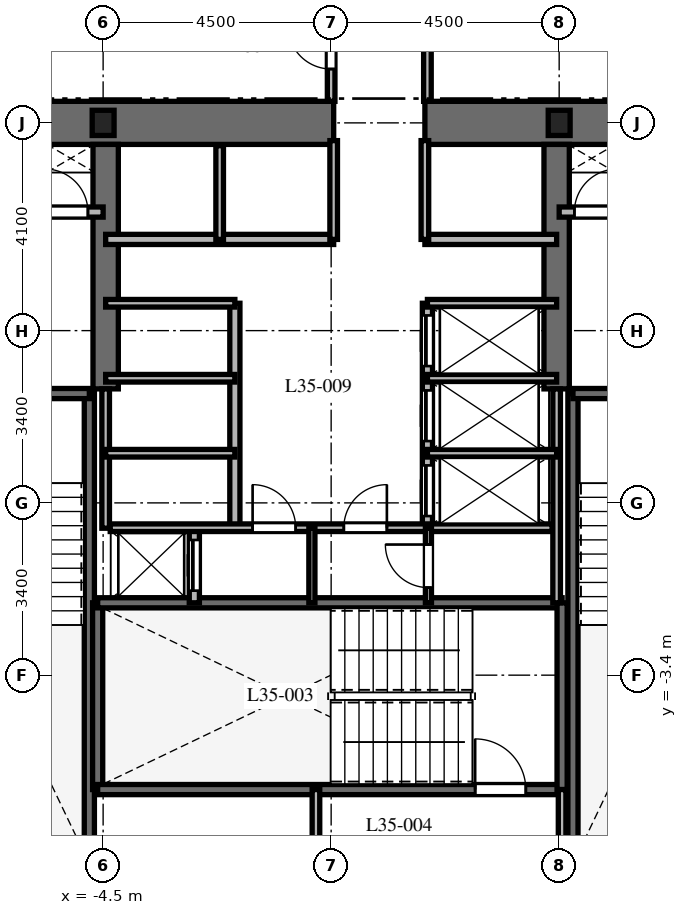
"""IFC4 building model, lengths in metres.
Left out: names, types, materials, properties, quantities, classifications, styles, units other than length and angle.
Written with IfcOpenShell. Run it as: python <this file> out.ifc"""

import sys

from ifc_helpers import new_model, si_unit, direction, frame, frame_2d, origin, origin_2d, place, context, subcontext, project, spatial, rectangle, i_section, extrude, element, fill, save


model = new_model("IFC4")
c1 = context("Model", 3, precision=1e-05, world=origin(), true_north=direction((0.0, 1.0)))
c2 = subcontext(c1, "Body", "Model", "MODEL_VIEW")
j1 = project(units=[si_unit("LENGTHUNIT", "METRE"), si_unit("PLANEANGLEUNIT", "RADIAN")], contexts=[c1])
p1 = place(None, origin())
s1 = spatial("IfcSite", under=j1, at=p1, CompositionType="ELEMENT")
p2 = place(p1, origin())
s2 = spatial("IfcBuilding", under=s1, at=p2, CompositionType="ELEMENT")
p3 = place(p2, frame((0.0, 0.0, 144.3)))
s3 = spatial("IfcBuildingStorey", under=s2, at=p3, CompositionType="ELEMENT", Elevation=144.3)
p4 = place(p3, frame((-9.425, 7.5, 0.0), z_axis=(0.0, 0.0, 1.0), x_axis=(1.0, 0.0, 0.0)))
e1 = element("IfcWall", 1, at=p4, inside=s3, PredefinedType="SHEAR", context=c2, shape_type="SweptSolid", body=[
    extrude(rectangle(XDim=9.475, YDim=0.85, at=frame_2d((4.738, 0.0))), origin(), (0.0, 0.0, 1.0), 3.7),
])
p5 = place(p3, frame((1.85, 7.5, 0.0), z_axis=(0.0, 0.0, 1.0), x_axis=(1.0, 0.0, 0.0)))
e2 = element("IfcWall", 2, at=p5, inside=s3, PredefinedType="SHEAR", context=c2, shape_type="SweptSolid", body=[
    extrude(rectangle(XDim=7.575, YDim=0.85, at=frame_2d((3.788, 0.0))), origin(), (0.0, 0.0, 1.0), 3.7),
])
for number, where, z_axis, x_axis in (
    (3, (-4.45, 2.25, 0.0), (0.0, 0.0, 1.0), (0.0, 1.0, 0.0)),
    (4, (4.45, 2.25, 0.0), (0.0, 0.0, 1.0), (0.0, 1.0, 0.0)),
):
    element("IfcWall", number, at=place(p3, frame(where, z_axis=z_axis, x_axis=x_axis)), inside=s3, PredefinedType="SHEAR", context=c2, shape_type="SweptSolid", body=[
        extrude(rectangle(XDim=4.825, YDim=0.5, at=frame_2d((2.413, 0.0))), origin(), (0.0, 0.0, 1.0), 3.7),
    ])
p6 = place(p3, frame((-4.772, -6.985, 0.0), z_axis=(0.0, 0.0, 1.0), x_axis=(0.0, 1.0, 0.0)))
e5 = element("IfcWall", 5, at=p6, inside=s3, PredefinedType="SHEAR", context=c2, shape_type="SweptSolid", body=[
    extrude(rectangle(XDim=9.143, YDim=0.2, at=frame_2d((4.572, 0.0))), origin(), (0.0, 0.0, 1.0), 3.7),
])
p7 = place(p3, frame((-8.458, 2.158, 0.0), z_axis=(0.0, 0.0, 1.0), x_axis=(1.0, 0.0, 0.0)))
e6 = element("IfcWall", 6, at=p7, inside=s3, PredefinedType="SHEAR", context=c2, shape_type="SweptSolid", body=[
    extrude(rectangle(XDim=3.686, YDim=0.2, at=frame_2d((1.843, 0.0))), origin(), (0.0, 0.0, 1.0), 3.7),
])
p8 = place(p7, frame((1.3, 0.0, 0.0)))
e7 = element("IfcOpeningElement", 7, at=p8, cuts=e6, PredefinedType="OPENING", context=c2, shape_type="SweptSolid", body=[
    extrude(rectangle(XDim=1.0, YDim=2.15, at=frame_2d((0.5, 1.075))), frame((0.0, 0.11, 0.0), z_axis=(0.0, -1.0, 0.0), x_axis=(1.0, 0.0, 0.0)), (0.0, 0.0, 1.0), 0.22),
])
p9 = place(p3, frame((4.772, -6.985, 0.0), z_axis=(0.0, 0.0, 1.0), x_axis=(0.0, 1.0, 0.0)))
e8 = element("IfcWall", 8, at=p9, inside=s3, PredefinedType="SHEAR", context=c2, shape_type="SweptSolid", body=[
    extrude(rectangle(XDim=9.143, YDim=0.2, at=frame_2d((4.572, 0.0))), origin(), (0.0, 0.0, 1.0), 3.7),
])
p10 = place(p3, frame((4.772, 2.158, 0.0), z_axis=(0.0, 0.0, 1.0), x_axis=(1.0, 0.0, 0.0)))
e9 = element("IfcWall", 9, at=p10, inside=s3, PredefinedType="SHEAR", context=c2, shape_type="SweptSolid", body=[
    extrude(rectangle(XDim=3.686, YDim=0.2, at=frame_2d((1.843, 0.0))), origin(), (0.0, 0.0, 1.0), 3.7),
])
p11 = place(p10, frame((1.35, 0.0, 0.0)))
e10 = element("IfcOpeningElement", 10, at=p11, cuts=e9, PredefinedType="OPENING", context=c2, shape_type="SweptSolid", body=[
    extrude(rectangle(XDim=1.0, YDim=2.15, at=frame_2d((0.5, 1.075))), frame((0.0, 0.11, 0.0), z_axis=(0.0, -1.0, 0.0), x_axis=(1.0, 0.0, 0.0)), (0.0, 0.0, 1.0), 0.22),
])
p12 = place(p3, frame((-4.608, -5.658, 0.0), z_axis=(0.0, 0.0, 1.0), x_axis=(0.0, 1.0, 0.0)))
e11 = element("IfcWall", 11, at=p12, inside=s3, PredefinedType="SHEAR", context=c2, shape_type="SweptSolid", body=[
    extrude(rectangle(XDim=3.686, YDim=0.2, at=frame_2d((1.843, 0.0))), origin(), (0.0, 0.0, 1.0), 3.7),
])
p13 = place(p3, frame((-4.608, -5.658, 0.0), z_axis=(0.0, 0.0, 1.0), x_axis=(1.0, 0.0, 0.0)))
e12 = element("IfcWall", 12, at=p13, inside=s3, PredefinedType="SHEAR", context=c2, shape_type="SweptSolid", body=[
    extrude(rectangle(XDim=9.166, YDim=0.2, at=frame_2d((4.583, 0.0))), origin(), (0.0, 0.0, 1.0), 3.7),
])
p14 = place(p13, frame((7.45, 0.0, 0.0)))
e13 = element("IfcOpeningElement", 13, at=p14, cuts=e12, PredefinedType="OPENING", context=c2, shape_type="SweptSolid", body=[
    extrude(rectangle(XDim=1.0, YDim=2.15, at=frame_2d((0.5, 1.075))), frame((0.0, 0.11, 0.0), z_axis=(0.0, -1.0, 0.0), x_axis=(1.0, 0.0, 0.0)), (0.0, 0.0, 1.0), 0.22),
])
p15 = place(p3, frame((-4.608, -1.972, 0.0), z_axis=(0.0, 0.0, 1.0), x_axis=(1.0, 0.0, 0.0)))
e14 = element("IfcWall", 14, at=p15, inside=s3, PredefinedType="SHEAR", context=c2, shape_type="SweptSolid", body=[
    extrude(rectangle(XDim=9.166, YDim=0.2, at=frame_2d((4.583, 0.0))), origin(), (0.0, 0.0, 1.0), 3.7),
])
p16 = place(p3, frame((4.558, -5.658, 0.0), z_axis=(0.0, 0.0, 1.0), x_axis=(0.0, 1.0, 0.0)))
e15 = element("IfcWall", 15, at=p16, inside=s3, PredefinedType="SHEAR", context=c2, shape_type="SweptSolid", body=[
    extrude(rectangle(XDim=3.686, YDim=0.2, at=frame_2d((1.843, 0.0))), origin(), (0.0, 0.0, 1.0), 3.7),
])
for number, where, z_axis, x_axis in (
    (16, (4.5, 7.5, 0.0), (0.0, 0.0, 1.0), (1.0, 0.0, 0.0)),
    (17, (-4.5, 7.5, 0.0), (0.0, 0.0, 1.0), (1.0, 0.0, 0.0)),
):
    element("IfcColumn", number, at=place(p3, frame(where, z_axis=z_axis, x_axis=x_axis)), inside=s3, PredefinedType="COLUMN", context=c2, shape_type="SweptSolid", body=[
        extrude(i_section(OverallWidth=0.432, OverallDepth=0.498, WebThickness=0.056, FlangeThickness=0.089, at=origin_2d()), origin(), (0.0, 0.0, 1.0), 3.7),
    ])
for number, where, z_axis, x_axis in (
    (18, (-0.3, -7.02, 0.0), (0.0, 0.0, 1.0), (0.0, 1.0, 0.0)),
    (19, (4.558, -7.02, 0.0), (0.0, 0.0, 1.0), (0.0, 1.0, 0.0)),
):
    element("IfcWall", number, at=place(p3, frame(where, z_axis=z_axis, x_axis=x_axis)), inside=s3, PredefinedType="PARTITIONING", context=c2, shape_type="SweptSolid", body=[
        extrude(rectangle(XDim=1.362, YDim=0.15, at=frame_2d((0.681, 0.0))), origin(), (0.0, 0.0, 1.0), 3.4),
    ])
p17 = place(p3, frame((-8.55, 5.74, 0.0), z_axis=(0.0, 0.0, 1.0), x_axis=(1.0, 0.0, 0.0)))
e20 = element("IfcWall", 20, at=p17, inside=s3, PredefinedType="PARTITIONING", context=c2, shape_type="SweptSolid", body=[
    extrude(rectangle(XDim=4.05, YDim=0.2, at=frame_2d((2.025, 0.0))), origin(), (0.0, 0.0, 1.0), 3.4),
])
p18 = place(p17, frame((0.75, 0.0, 0.0)))
e21 = element("IfcOpeningElement", 21, at=p18, cuts=e20, PredefinedType="OPENING", context=c2, shape_type="SweptSolid", body=[
    extrude(rectangle(XDim=1.1, YDim=2.2, at=frame_2d((0.55, 1.1))), frame((0.0, 0.11, 0.0), z_axis=(0.0, -1.0, 0.0), x_axis=(1.0, 0.0, 0.0)), (0.0, 0.0, 1.0), 0.22),
])
p19 = place(p17, frame((2.9, 0.0, 0.0)))
e22 = element("IfcOpeningElement", 22, at=p19, cuts=e20, PredefinedType="OPENING", context=c2, shape_type="SweptSolid", body=[
    extrude(rectangle(XDim=0.85, YDim=2.03, at=frame_2d((0.425, 1.015))), frame((0.0, 0.11, 0.0), z_axis=(0.0, -1.0, 0.0), x_axis=(1.0, 0.0, 0.0)), (0.0, 0.0, 1.0), 0.22),
])
p20 = place(p3, frame((4.5, 5.74, 0.0), z_axis=(0.0, 0.0, 1.0), x_axis=(1.0, 0.0, 0.0)))
e23 = element("IfcWall", 23, at=p20, inside=s3, PredefinedType="PARTITIONING", context=c2, shape_type="SweptSolid", body=[
    extrude(rectangle(XDim=4.05, YDim=0.2, at=frame_2d((2.025, 0.0))), origin(), (0.0, 0.0, 1.0), 3.4),
])
p21 = place(p20, frame((0.3, 0.0, 0.0)))
e24 = element("IfcOpeningElement", 24, at=p21, cuts=e23, PredefinedType="OPENING", context=c2, shape_type="SweptSolid", body=[
    extrude(rectangle(XDim=0.85, YDim=2.03, at=frame_2d((0.425, 1.015))), frame((0.0, 0.11, 0.0), z_axis=(0.0, -1.0, 0.0), x_axis=(1.0, 0.0, 0.0)), (0.0, 0.0, 1.0), 0.22),
])
p22 = place(p20, frame((2.15, 0.0, 0.0)))
e25 = element("IfcOpeningElement", 25, at=p22, cuts=e23, PredefinedType="OPENING", context=c2, shape_type="SweptSolid", body=[
    extrude(rectangle(XDim=1.1, YDim=2.2, at=frame_2d((0.55, 1.1))), frame((0.0, 0.11, 0.0), z_axis=(0.0, -1.0, 0.0), x_axis=(1.0, 0.0, 0.0)), (0.0, 0.0, 1.0), 0.22),
])
p23 = place(p3, frame((-2.7, -1.972, 0.0), z_axis=(0.0, 0.0, 1.0), x_axis=(0.0, 1.0, 0.0)))
e26 = element("IfcWall", 26, at=p23, inside=s3, PredefinedType="PARTITIONING", context=c2, shape_type="SweptSolid", body=[
    extrude(rectangle(XDim=1.472, YDim=0.2, at=frame_2d((0.736, 0.0))), origin(), (0.0, 0.0, 1.0), 3.4),
])
p24 = place(p23, frame((0.24, 0.0, 0.0)))
e27 = element("IfcOpeningElement", 27, at=p24, cuts=e26, PredefinedType="OPENING", context=c2, shape_type="SweptSolid", body=[
    extrude(rectangle(XDim=1.0, YDim=2.2, at=frame_2d((0.5, 1.1))), frame((0.0, 0.11, 0.0), z_axis=(0.0, -1.0, 0.0), x_axis=(1.0, 0.0, 0.0)), (0.0, 0.0, 1.0), 0.22),
])
p25 = place(p3, frame((-4.45, 5.2, 0.0), z_axis=(0.0, 0.0, 1.0), x_axis=(1.0, 0.0, 0.0)))
e28 = element("IfcWall", 28, at=p25, inside=s3, PredefinedType="PARTITIONING", context=c2, shape_type="SweptSolid", body=[
    extrude(rectangle(XDim=4.5, YDim=0.2, at=frame_2d((2.25, 0.0))), origin(), (0.0, 0.0, 1.0), 3.4),
])
p26 = place(p3, frame((1.85, 5.2, 0.0), z_axis=(0.0, 0.0, 1.0), x_axis=(1.0, 0.0, 0.0)))
e29 = element("IfcWall", 29, at=p26, inside=s3, PredefinedType="PARTITIONING", context=c2, shape_type="SweptSolid", body=[
    extrude(rectangle(XDim=2.6, YDim=0.2, at=frame_2d((1.3, 0.0))), origin(), (0.0, 0.0, 1.0), 3.4),
])
p27 = place(p3, frame((-2.2, 5.2, 0.0), z_axis=(0.0, 0.0, 1.0), x_axis=(0.0, 1.0, 0.0)))
e30 = element("IfcWall", 30, at=p27, inside=s3, PredefinedType="PARTITIONING", context=c2, shape_type="SweptSolid", body=[
    extrude(rectangle(XDim=1.85, YDim=0.15, at=frame_2d((0.925, 0.0))), origin(), (0.0, 0.0, 1.0), 3.4),
])
for number, where, z_axis, x_axis in (
    (31, (0.05, 5.2, 0.0), (0.0, 0.0, 1.0), (0.0, 1.0, 0.0)),
    (32, (1.85, 5.2, 0.0), (0.0, 0.0, 1.0), (0.0, 1.0, 0.0)),
):
    element("IfcWall", number, at=place(p3, frame(where, z_axis=z_axis, x_axis=x_axis)), inside=s3, PredefinedType="PARTITIONING", context=c2, shape_type="SweptSolid", body=[
        extrude(rectangle(XDim=1.95, YDim=0.15, at=frame_2d((0.975, 0.0))), origin(), (0.0, 0.0, 1.0), 3.4),
    ])
p28 = place(p3, frame((-4.45, -0.5, 0.0), z_axis=(0.0, 0.0, 1.0), x_axis=(0.0, 1.0, 0.0)))
e33 = element("IfcWall", 33, at=p28, inside=s3, PredefinedType="PARTITIONING", context=c2, shape_type="SweptSolid", body=[
    extrude(rectangle(XDim=2.75, YDim=0.15, at=frame_2d((1.375, 0.0))), origin(), (0.0, 0.0, 1.0), 3.4),
])
p29 = place(p3, frame((4.45, -1.972, 0.0), z_axis=(0.0, 0.0, 1.0), x_axis=(0.0, 1.0, 0.0)))
e34 = element("IfcWall", 34, at=p29, inside=s3, PredefinedType="PARTITIONING", context=c2, shape_type="SweptSolid", body=[
    extrude(rectangle(XDim=4.222, YDim=0.15, at=frame_2d((2.111, 0.0))), origin(), (0.0, 0.0, 1.0), 3.4),
])
p30 = place(p3, frame((-1.9, -0.5, 0.0), z_axis=(0.0, 0.0, 1.0), x_axis=(0.0, 1.0, 0.0)))
e35 = element("IfcWall", 35, at=p30, inside=s3, PredefinedType="PARTITIONING", context=c2, shape_type="SweptSolid", body=[
    extrude(rectangle(XDim=4.44, YDim=0.2, at=frame_2d((2.22, 0.0))), origin(), (0.0, 0.0, 1.0), 3.4),
])
for number, where, z_axis, x_axis in (
    (36, (-4.45, 3.94, 0.0), (0.0, 0.0, 1.0), (1.0, 0.0, 0.0)),
    (37, (-4.45, 0.98, 0.0), (0.0, 0.0, 1.0), (1.0, 0.0, 0.0)),
    (38, (-4.45, 2.46, 0.0), (0.0, 0.0, 1.0), (1.0, 0.0, 0.0)),
):
    element("IfcWall", number, at=place(p3, frame(where, z_axis=z_axis, x_axis=x_axis)), inside=s3, PredefinedType="PARTITIONING", context=c2, shape_type="SweptSolid", body=[
        extrude(rectangle(XDim=2.55, YDim=0.15, at=frame_2d((1.275, 0.0))), origin(), (0.0, 0.0, 1.0), 3.4),
    ])
p31 = place(p3, frame((1.9, -0.5, 0.0), z_axis=(0.0, 0.0, 1.0), x_axis=(0.0, 1.0, 0.0)))
e39 = element("IfcWall", 39, at=p31, inside=s3, PredefinedType="PARTITIONING", context=c2, shape_type="SweptSolid", body=[
    extrude(rectangle(XDim=4.44, YDim=0.2, at=frame_2d((2.22, 0.0))), origin(), (0.0, 0.0, 1.0), 3.4),
])
p32 = place(p31, frame((0.24, 0.0, 0.0)))
e40 = element("IfcOpeningElement", 40, at=p32, cuts=e39, PredefinedType="OPENING", context=c2, shape_type="SweptSolid", body=[
    extrude(rectangle(XDim=1.0, YDim=2.2, at=frame_2d((0.5, 1.1))), frame((0.0, 0.11, 0.0), z_axis=(0.0, -1.0, 0.0), x_axis=(1.0, 0.0, 0.0)), (0.0, 0.0, 1.0), 0.22),
])
p33 = place(p31, frame((1.72, 0.0, 0.0)))
e41 = element("IfcOpeningElement", 41, at=p33, cuts=e39, PredefinedType="OPENING", context=c2, shape_type="SweptSolid", body=[
    extrude(rectangle(XDim=1.0, YDim=2.2, at=frame_2d((0.5, 1.1))), frame((0.0, 0.11, 0.0), z_axis=(0.0, -1.0, 0.0), x_axis=(1.0, 0.0, 0.0)), (0.0, 0.0, 1.0), 0.22),
])
p34 = place(p31, frame((3.2, 0.0, 0.0)))
e42 = element("IfcOpeningElement", 42, at=p34, cuts=e39, PredefinedType="OPENING", context=c2, shape_type="SweptSolid", body=[
    extrude(rectangle(XDim=1.0, YDim=2.2, at=frame_2d((0.5, 1.1))), frame((0.0, 0.11, 0.0), z_axis=(0.0, -1.0, 0.0), x_axis=(1.0, 0.0, 0.0)), (0.0, 0.0, 1.0), 0.22),
])
for number, where, z_axis, x_axis in (
    (43, (1.9, 3.94, 0.0), (0.0, 0.0, 1.0), (1.0, 0.0, 0.0)),
    (44, (1.9, 0.98, 0.0), (0.0, 0.0, 1.0), (1.0, 0.0, 0.0)),
    (45, (1.9, 2.46, 0.0), (0.0, 0.0, 1.0), (1.0, 0.0, 0.0)),
):
    element("IfcWall", number, at=place(p3, frame(where, z_axis=z_axis, x_axis=x_axis)), inside=s3, PredefinedType="PARTITIONING", context=c2, shape_type="SweptSolid", body=[
        extrude(rectangle(XDim=2.55, YDim=0.15, at=frame_2d((1.275, 0.0))), origin(), (0.0, 0.0, 1.0), 3.4),
    ])
p35 = place(p3, frame((-4.36, -0.49, 0.0), z_axis=(0.0, 0.0, 1.0), x_axis=(1.0, 0.0, 0.0)))
e46 = element("IfcWall", 46, at=p35, inside=s3, PredefinedType="PARTITIONING", context=c2, shape_type="SweptSolid", body=[
    extrude(rectangle(XDim=8.72, YDim=0.15, at=frame_2d((4.36, 0.0))), origin(), (0.0, 0.0, 1.0), 3.4),
])
p36 = place(p35, frame((2.81, 0.0, 0.0)))
e47 = element("IfcOpeningElement", 47, at=p36, cuts=e46, PredefinedType="OPENING", context=c2, shape_type="SweptSolid", body=[
    extrude(rectangle(XDim=0.85, YDim=2.03, at=frame_2d((0.425, 1.015))), frame((0.0, 0.085, 0.0), z_axis=(0.0, -1.0, 0.0), x_axis=(1.0, 0.0, 0.0)), (0.0, 0.0, 1.0), 0.17),
])
p37 = place(p35, frame((4.61, 0.0, 0.0)))
e48 = element("IfcOpeningElement", 48, at=p37, cuts=e46, PredefinedType="OPENING", context=c2, shape_type="SweptSolid", body=[
    extrude(rectangle(XDim=0.85, YDim=2.03, at=frame_2d((0.425, 1.015))), frame((0.0, 0.085, 0.0), z_axis=(0.0, -1.0, 0.0), x_axis=(1.0, 0.0, 0.0)), (0.0, 0.0, 1.0), 0.17),
])
p38 = place(p3, frame((-0.38, -1.972, 0.0), z_axis=(0.0, 0.0, 1.0), x_axis=(0.0, 1.0, 0.0)))
e49 = element("IfcWall", 49, at=p38, inside=s3, PredefinedType="PARTITIONING", context=c2, shape_type="SweptSolid", body=[
    extrude(rectangle(XDim=1.472, YDim=0.12, at=frame_2d((0.736, 0.0))), origin(), (0.0, 0.0, 1.0), 3.4),
])
p39 = place(p3, frame((1.92, -1.972, 0.0), z_axis=(0.0, 0.0, 1.0), x_axis=(0.0, 1.0, 0.0)))
e50 = element("IfcWall", 50, at=p39, inside=s3, PredefinedType="PARTITIONING", context=c2, shape_type="SweptSolid", body=[
    extrude(rectangle(XDim=1.472, YDim=0.12, at=frame_2d((0.736, 0.0))), origin(), (0.0, 0.0, 1.0), 3.4),
])
p40 = place(p39, frame((0.3, 0.0, 0.0)))
e51 = element("IfcOpeningElement", 51, at=p40, cuts=e50, PredefinedType="OPENING", context=c2, shape_type="SweptSolid", body=[
    extrude(rectangle(XDim=0.85, YDim=2.03, at=frame_2d((0.425, 1.015))), frame((0.0, 0.07, 0.0), z_axis=(0.0, -1.0, 0.0), x_axis=(1.0, 0.0, 0.0)), (0.0, 0.0, 1.0), 0.14),
])
p41 = place(p3, frame((1.9, 10.05, 0.0), z_axis=(0.0, 0.0, 1.0), x_axis=(0.0, -1.0, 0.0)))
e52 = element("IfcWall", 52, at=p41, inside=s3, PredefinedType="PARTITIONING", context=c2, shape_type="SweptSolid", body=[
    extrude(rectangle(XDim=2.125, YDim=0.15, at=frame_2d((1.062, 0.0))), origin(), (0.0, 0.0, 1.0), 3.4),
])
p42 = place(p3, frame((0.0, 7.925, 0.0), z_axis=(0.0, 0.0, 1.0), x_axis=(0.0, 1.0, 0.0)))
e53 = element("IfcWall", 53, at=p42, inside=s3, PredefinedType="PARTITIONING", context=c2, shape_type="SweptSolid", body=[
    extrude(rectangle(XDim=2.125, YDim=0.15, at=frame_2d((1.062, 0.0))), origin(), (0.0, 0.0, 1.0), 3.4),
])
p43 = place(p42, frame((0.638, 0.0, 0.0)))
e54 = element("IfcOpeningElement", 54, at=p43, cuts=e53, PredefinedType="OPENING", context=c2, shape_type="SweptSolid", body=[
    extrude(rectangle(XDim=0.85, YDim=2.03, at=frame_2d((0.425, 1.015))), frame((0.0, 0.085, 0.0), z_axis=(0.0, -1.0, 0.0), x_axis=(1.0, 0.0, 0.0)), (0.0, 0.0, 1.0), 0.17),
])
p44 = place(p14, origin())
e55 = element("IfcDoor", 55, at=p44, inside=s3, OperationType="SINGLE_SWING_LEFT", PredefinedType="DOOR", context=c2, shape_type="SweptSolid", body=[
    extrude(rectangle(XDim=1.0, YDim=2.15, at=frame_2d((0.5, 1.075))), frame((0.0, 0.025, 0.0), z_axis=(0.0, -1.0, 0.0), x_axis=(1.0, 0.0, 0.0)), (0.0, 0.0, 1.0), 0.05),
])
fill(e13, e55)
p45 = place(p19, origin())
e56 = element("IfcDoor", 56, at=p45, inside=s3, OperationType="SINGLE_SWING_LEFT", PredefinedType="DOOR", context=c2, shape_type="SweptSolid", body=[
    extrude(rectangle(XDim=0.85, YDim=2.03, at=frame_2d((0.425, 1.015))), frame((0.0, 0.025, 0.0), z_axis=(0.0, -1.0, 0.0), x_axis=(1.0, 0.0, 0.0)), (0.0, 0.0, 1.0), 0.05),
])
fill(e22, e56)
p46 = place(p21, origin())
e57 = element("IfcDoor", 57, at=p46, inside=s3, OperationType="SINGLE_SWING_RIGHT", PredefinedType="DOOR", context=c2, shape_type="SweptSolid", body=[
    extrude(rectangle(XDim=0.85, YDim=2.03, at=frame_2d((0.425, 1.015))), frame((0.0, 0.025, 0.0), z_axis=(0.0, -1.0, 0.0), x_axis=(1.0, 0.0, 0.0)), (0.0, 0.0, 1.0), 0.05),
])
fill(e24, e57)
p47 = place(p24, origin())
e58 = element("IfcDoor", 58, at=p47, inside=s3, OperationType="SLIDING_TO_LEFT", PredefinedType="DOOR", context=c2, shape_type="SweptSolid", body=[
    extrude(rectangle(XDim=1.0, YDim=2.2, at=frame_2d((0.5, 1.1))), frame((0.0, 0.025, 0.0), z_axis=(0.0, -1.0, 0.0), x_axis=(1.0, 0.0, 0.0)), (0.0, 0.0, 1.0), 0.05),
])
fill(e27, e58)
p48 = place(p32, origin())
e59 = element("IfcDoor", 59, at=p48, inside=s3, OperationType="SLIDING_TO_RIGHT", PredefinedType="DOOR", context=c2, shape_type="SweptSolid", body=[
    extrude(rectangle(XDim=1.0, YDim=2.2, at=frame_2d((0.5, 1.1))), frame((0.0, 0.025, 0.0), z_axis=(0.0, -1.0, 0.0), x_axis=(1.0, 0.0, 0.0)), (0.0, 0.0, 1.0), 0.05),
])
fill(e40, e59)
p49 = place(p33, origin())
e60 = element("IfcDoor", 60, at=p49, inside=s3, OperationType="SLIDING_TO_RIGHT", PredefinedType="DOOR", context=c2, shape_type="SweptSolid", body=[
    extrude(rectangle(XDim=1.0, YDim=2.2, at=frame_2d((0.5, 1.1))), frame((0.0, 0.025, 0.0), z_axis=(0.0, -1.0, 0.0), x_axis=(1.0, 0.0, 0.0)), (0.0, 0.0, 1.0), 0.05),
])
fill(e41, e60)
p50 = place(p34, origin())
e61 = element("IfcDoor", 61, at=p50, inside=s3, OperationType="SLIDING_TO_RIGHT", PredefinedType="DOOR", context=c2, shape_type="SweptSolid", body=[
    extrude(rectangle(XDim=1.0, YDim=2.2, at=frame_2d((0.5, 1.1))), frame((0.0, 0.025, 0.0), z_axis=(0.0, -1.0, 0.0), x_axis=(1.0, 0.0, 0.0)), (0.0, 0.0, 1.0), 0.05),
])
fill(e42, e61)
p51 = place(p36, origin())
e62 = element("IfcDoor", 62, at=p51, inside=s3, OperationType="SINGLE_SWING_LEFT", PredefinedType="DOOR", context=c2, shape_type="SweptSolid", body=[
    extrude(rectangle(XDim=0.85, YDim=2.03, at=frame_2d((0.425, 1.015))), frame((0.0, 0.025, 0.0), z_axis=(0.0, -1.0, 0.0), x_axis=(1.0, 0.0, 0.0)), (0.0, 0.0, 1.0), 0.05),
])
fill(e47, e62)
p52 = place(p37, origin())
e63 = element("IfcDoor", 63, at=p52, inside=s3, OperationType="SINGLE_SWING_RIGHT", PredefinedType="DOOR", context=c2, shape_type="SweptSolid", body=[
    extrude(rectangle(XDim=0.85, YDim=2.03, at=frame_2d((0.425, 1.015))), frame((0.0, 0.025, 0.0), z_axis=(0.0, -1.0, 0.0), x_axis=(1.0, 0.0, 0.0)), (0.0, 0.0, 1.0), 0.05),
])
fill(e48, e63)
p53 = place(p40, origin())
e64 = element("IfcDoor", 64, at=p53, inside=s3, OperationType="SINGLE_SWING_RIGHT", PredefinedType="DOOR", context=c2, shape_type="SweptSolid", body=[
    extrude(rectangle(XDim=0.85, YDim=2.03, at=frame_2d((0.425, 1.015))), frame((0.0, 0.025, 0.0), z_axis=(0.0, -1.0, 0.0), x_axis=(1.0, 0.0, 0.0)), (0.0, 0.0, 1.0), 0.05),
])
fill(e51, e64)
p54 = place(p43, origin())
e65 = element("IfcDoor", 65, at=p54, inside=s3, OperationType="SINGLE_SWING_RIGHT", PredefinedType="DOOR", context=c2, shape_type="SweptSolid", body=[
    extrude(rectangle(XDim=0.85, YDim=2.03, at=frame_2d((0.425, 1.015))), frame((0.0, 0.025, 0.0), z_axis=(0.0, -1.0, 0.0), x_axis=(1.0, 0.0, 0.0)), (0.0, 0.0, 1.0), 0.05),
])
fill(e54, e65)
save(model, sys.argv[1])
